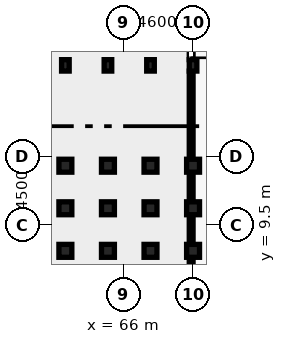
"""IFC4 building model, lengths in metres.
Left out: names, types, materials, properties, quantities, classifications, styles, units other than length and angle.
Written with IfcOpenShell. Run it as: python <this file> out.ifc"""

import sys

from ifc_helpers import new_model, si_unit, direction, frame, frame_2d, origin, origin_2d, place, context, subcontext, project, spatial, rectangle, extrude, element, fill, save


model = new_model("IFC4")
c1 = context("Model", 3, precision=1e-05, world=origin(), true_north=direction((0.0, 1.0)))
c2 = subcontext(c1, "Body", "Model", "MODEL_VIEW")
j1 = project(units=[si_unit("LENGTHUNIT", "METRE"), si_unit("PLANEANGLEUNIT", "RADIAN")], contexts=[c1])
p1 = place(None, origin())
s1 = spatial("IfcSite", under=j1, at=p1, CompositionType="ELEMENT")
p2 = place(p1, origin())
s2 = spatial("IfcBuilding", under=s1, at=p2, CompositionType="ELEMENT")
p3 = place(p2, origin())
s3 = spatial("IfcBuildingStorey", under=s2, at=p3, CompositionType="ELEMENT", Elevation=0.0)
p4 = place(p3, frame((62.2, 20.0, 0.0), z_axis=(0.0, 0.0, 1.0), x_axis=(1.0, 0.0, 0.0)))
e1 = element("IfcColumn", 1, at=p4, inside=s3, PredefinedType="COLUMN", context=c2, shape_type="SweptSolid", body=[
    extrude(rectangle(XDim=0.5, YDim=0.75, at=origin_2d()), origin(), (0.0, 0.0, 1.0), 4.15),
])
for number, where, z_axis, x_axis in (
    (2, (62.2, 13.4, 0.0), (0.0, 0.0, 1.0), (1.0, 0.0, 0.0)),
    (3, (62.2, 10.6, 0.0), (0.0, 0.0, 1.0), (1.0, 0.0, 0.0)),
    (4, (62.2, 7.8, 0.0), (0.0, 0.0, 1.0), (1.0, 0.0, 0.0)),
):
    element("IfcColumn", number, at=place(p3, frame(where, z_axis=z_axis, x_axis=x_axis)), inside=s3, PredefinedType="COLUMN", context=c2, shape_type="SweptSolid", body=[
        extrude(rectangle(XDim=0.85, YDim=0.85, at=origin_2d()), origin(), (0.0, 0.0, 1.0), 4.15),
    ])
p5 = place(p3, frame((65.0, 20.0, 0.0), z_axis=(0.0, 0.0, 1.0), x_axis=(1.0, 0.0, 0.0)))
e5 = element("IfcColumn", 5, at=p5, inside=s3, PredefinedType="COLUMN", context=c2, shape_type="SweptSolid", body=[
    extrude(rectangle(XDim=0.5, YDim=0.75, at=origin_2d()), origin(), (0.0, 0.0, 1.0), 4.15),
])
for number, where, z_axis, x_axis in (
    (6, (65.0, 13.4, 0.0), (0.0, 0.0, 1.0), (1.0, 0.0, 0.0)),
    (7, (65.0, 10.6, 0.0), (0.0, 0.0, 1.0), (1.0, 0.0, 0.0)),
    (8, (65.0, 7.8, 0.0), (0.0, 0.0, 1.0), (1.0, 0.0, 0.0)),
):
    element("IfcColumn", number, at=place(p3, frame(where, z_axis=z_axis, x_axis=x_axis)), inside=s3, PredefinedType="COLUMN", context=c2, shape_type="SweptSolid", body=[
        extrude(rectangle(XDim=0.85, YDim=0.85, at=origin_2d()), origin(), (0.0, 0.0, 1.0), 4.15),
    ])
p6 = place(p3, frame((67.8, 20.0, 0.0), z_axis=(0.0, 0.0, 1.0), x_axis=(1.0, 0.0, 0.0)))
e9 = element("IfcColumn", 9, at=p6, inside=s3, PredefinedType="COLUMN", context=c2, shape_type="SweptSolid", body=[
    extrude(rectangle(XDim=0.5, YDim=0.75, at=origin_2d()), origin(), (0.0, 0.0, 1.0), 4.15),
])
for number, where, z_axis, x_axis in (
    (10, (67.8, 13.4, 0.0), (0.0, 0.0, 1.0), (1.0, 0.0, 0.0)),
    (11, (67.8, 10.6, 0.0), (0.0, 0.0, 1.0), (1.0, 0.0, 0.0)),
    (12, (67.8, 7.8, 0.0), (0.0, 0.0, 1.0), (1.0, 0.0, 0.0)),
):
    element("IfcColumn", number, at=place(p3, frame(where, z_axis=z_axis, x_axis=x_axis)), inside=s3, PredefinedType="COLUMN", context=c2, shape_type="SweptSolid", body=[
        extrude(rectangle(XDim=0.85, YDim=0.85, at=origin_2d()), origin(), (0.0, 0.0, 1.0), 4.15),
    ])
p7 = place(p3, frame((70.6, 20.0, 0.0), z_axis=(0.0, 0.0, 1.0), x_axis=(1.0, 0.0, 0.0)))
e13 = element("IfcColumn", 13, at=p7, inside=s3, PredefinedType="COLUMN", context=c2, shape_type="SweptSolid", body=[
    extrude(rectangle(XDim=0.5, YDim=0.75, at=origin_2d()), origin(), (0.0, 0.0, 1.0), 4.15),
])
for number, where, z_axis, x_axis in (
    (14, (70.6, 13.4, 0.0), (0.0, 0.0, 1.0), (1.0, 0.0, 0.0)),
    (15, (70.6, 10.6, 0.0), (0.0, 0.0, 1.0), (1.0, 0.0, 0.0)),
    (16, (70.6, 7.8, 0.0), (0.0, 0.0, 1.0), (1.0, 0.0, 0.0)),
):
    element("IfcColumn", number, at=place(p3, frame(where, z_axis=z_axis, x_axis=x_axis)), inside=s3, PredefinedType="COLUMN", context=c2, shape_type="SweptSolid", body=[
        extrude(rectangle(XDim=0.85, YDim=0.85, at=origin_2d()), origin(), (0.0, 0.0, 1.0), 4.15),
    ])
p8 = place(p3, frame((59.4, 20.0, 0.0), z_axis=(0.0, 0.0, 1.0), x_axis=(1.0, 0.0, 0.0)))
e17 = element("IfcWall", 17, at=p8, inside=s3, PredefinedType="STANDARD", context=c2, shape_type="SweptSolid", body=[
    extrude(rectangle(XDim=2.8, YDim=0.2, at=frame_2d((1.4, 0.0))), origin(), (0.0, 0.0, 1.0), 3.492),
])
p9 = place(p8, frame((0.9, 0.0, 0.0)))
e18 = element("IfcOpeningElement", 18, at=p9, cuts=e17, PredefinedType="OPENING", context=c2, shape_type="SweptSolid", body=[
    extrude(rectangle(XDim=1.0, YDim=2.15, at=frame_2d((0.5, 1.075))), frame((0.0, 0.11, 0.0), z_axis=(0.0, -1.0, 0.0), x_axis=(1.0, 0.0, 0.0)), (0.0, 0.0, 1.0), 0.22),
])
p10 = place(p3, frame((59.48, 7.8, 0.0), z_axis=(0.0, 0.0, 1.0), x_axis=(1.0, 0.0, 0.0)))
e19 = element("IfcWall", 19, at=p10, inside=s3, PredefinedType="PLUMBINGWALL", context=c2, shape_type="SweptSolid", body=[
    extrude(rectangle(XDim=2.64, YDim=0.16, at=frame_2d((1.32, 0.0))), origin(), (0.0, 0.0, 1.0), 3.492),
])
p11 = place(p10, frame((0.87, 0.0, 0.0)))
e20 = element("IfcOpeningElement", 20, at=p11, cuts=e19, PredefinedType="OPENING", context=c2, shape_type="SweptSolid", body=[
    extrude(rectangle(XDim=0.9, YDim=2.1, at=frame_2d((0.45, 1.05))), frame((0.0, 0.09, 0.0), z_axis=(0.0, -1.0, 0.0), x_axis=(1.0, 0.0, 0.0)), (0.0, 0.0, 1.0), 0.18),
])
p12 = place(p3, frame((62.2, 20.0, 0.0), z_axis=(0.0, 0.0, 1.0), x_axis=(1.0, 0.0, 0.0)))
e21 = element("IfcWall", 21, at=p12, inside=s3, PredefinedType="STANDARD", context=c2, shape_type="SweptSolid", body=[
    extrude(rectangle(XDim=2.8, YDim=0.2, at=frame_2d((1.4, 0.0))), origin(), (0.0, 0.0, 1.0), 3.492),
])
p13 = place(p3, frame((62.28, 7.8, 0.0), z_axis=(0.0, 0.0, 1.0), x_axis=(1.0, 0.0, 0.0)))
e22 = element("IfcWall", 22, at=p13, inside=s3, PredefinedType="PLUMBINGWALL", context=c2, shape_type="SweptSolid", body=[
    extrude(rectangle(XDim=2.64, YDim=0.16, at=frame_2d((1.32, 0.0))), origin(), (0.0, 0.0, 1.0), 3.492),
])
p14 = place(p13, frame((0.92, 0.0, 0.0)))
e23 = element("IfcOpeningElement", 23, at=p14, cuts=e22, PredefinedType="OPENING", context=c2, shape_type="SweptSolid", body=[
    extrude(rectangle(XDim=0.8, YDim=2.1, at=frame_2d((0.4, 1.05))), frame((0.0, 0.09, 0.0), z_axis=(0.0, -1.0, 0.0), x_axis=(1.0, 0.0, 0.0)), (0.0, 0.0, 1.0), 0.18),
])
p15 = place(p3, frame((65.0, 20.0, 0.0), z_axis=(0.0, 0.0, 1.0), x_axis=(1.0, 0.0, 0.0)))
e24 = element("IfcWall", 24, at=p15, inside=s3, PredefinedType="STANDARD", context=c2, shape_type="SweptSolid", body=[
    extrude(rectangle(XDim=2.8, YDim=0.2, at=frame_2d((1.4, 0.0))), origin(), (0.0, 0.0, 1.0), 3.492),
])
p16 = place(p15, frame((0.9, 0.0, 0.0)))
e25 = element("IfcOpeningElement", 25, at=p16, cuts=e24, PredefinedType="OPENING", context=c2, shape_type="SweptSolid", body=[
    extrude(rectangle(XDim=1.0, YDim=2.15, at=frame_2d((0.5, 1.075))), frame((0.0, 0.11, 0.0), z_axis=(0.0, -1.0, 0.0), x_axis=(1.0, 0.0, 0.0)), (0.0, 0.0, 1.0), 0.22),
])
p17 = place(p3, frame((65.08, 7.8, 0.0), z_axis=(0.0, 0.0, 1.0), x_axis=(1.0, 0.0, 0.0)))
e26 = element("IfcWall", 26, at=p17, inside=s3, PredefinedType="PLUMBINGWALL", context=c2, shape_type="SweptSolid", body=[
    extrude(rectangle(XDim=2.64, YDim=0.16, at=frame_2d((1.32, 0.0))), origin(), (0.0, 0.0, 1.0), 3.492),
])
p18 = place(p17, frame((0.87, 0.0, 0.0)))
e27 = element("IfcOpeningElement", 27, at=p18, cuts=e26, PredefinedType="OPENING", context=c2, shape_type="SweptSolid", body=[
    extrude(rectangle(XDim=0.9, YDim=2.1, at=frame_2d((0.45, 1.05))), frame((0.0, 0.09, 0.0), z_axis=(0.0, -1.0, 0.0), x_axis=(1.0, 0.0, 0.0)), (0.0, 0.0, 1.0), 0.18),
])
p19 = place(p3, frame((67.8, 20.0, 0.0), z_axis=(0.0, 0.0, 1.0), x_axis=(1.0, 0.0, 0.0)))
e28 = element("IfcWall", 28, at=p19, inside=s3, PredefinedType="STANDARD", context=c2, shape_type="SweptSolid", body=[
    extrude(rectangle(XDim=2.8, YDim=0.2, at=frame_2d((1.4, 0.0))), origin(), (0.0, 0.0, 1.0), 3.492),
])
p20 = place(p3, frame((67.88, 7.8, 0.0), z_axis=(0.0, 0.0, 1.0), x_axis=(1.0, 0.0, 0.0)))
e29 = element("IfcWall", 29, at=p20, inside=s3, PredefinedType="PLUMBINGWALL", context=c2, shape_type="SweptSolid", body=[
    extrude(rectangle(XDim=2.64, YDim=0.16, at=frame_2d((1.32, 0.0))), origin(), (0.0, 0.0, 1.0), 3.492),
])
p21 = place(p20, frame((0.92, 0.0, 0.0)))
e30 = element("IfcOpeningElement", 30, at=p21, cuts=e29, PredefinedType="OPENING", context=c2, shape_type="SweptSolid", body=[
    extrude(rectangle(XDim=0.8, YDim=2.1, at=frame_2d((0.4, 1.05))), frame((0.0, 0.09, 0.0), z_axis=(0.0, -1.0, 0.0), x_axis=(1.0, 0.0, 0.0)), (0.0, 0.0, 1.0), 0.18),
])
p22 = place(p3, frame((62.2, 19.95, 0.0), z_axis=(0.0, 0.0, 1.0), x_axis=(0.0, -1.0, 0.0)))
e31 = element("IfcWall", 31, at=p22, inside=s3, PredefinedType="PARTITIONING", context=c2, shape_type="SweptSolid", body=[
    extrude(rectangle(XDim=6.53, YDim=0.15, at=frame_2d((3.265, 0.0))), origin(), (0.0, 0.0, 1.0), 3.492),
])
p23 = place(p22, frame((2.815, 0.0, 0.0)))
e32 = element("IfcOpeningElement", 32, at=p23, cuts=e31, PredefinedType="OPENING", context=c2, shape_type="SweptSolid", body=[
    extrude(rectangle(XDim=0.9, YDim=2.1, at=frame_2d((0.45, 1.05))), frame((0.0, 0.085, 0.0), z_axis=(0.0, -1.0, 0.0), x_axis=(1.0, 0.0, 0.0)), (0.0, 0.0, 1.0), 0.17),
])
p24 = place(p3, frame((62.2, 13.3, 0.0), z_axis=(0.0, 0.0, 1.0), x_axis=(0.0, -1.0, 0.0)))
e33 = element("IfcWall", 33, at=p24, inside=s3, PredefinedType="PARTITIONING", context=c2, shape_type="SweptSolid", body=[
    extrude(rectangle(XDim=10.82, YDim=0.15, at=frame_2d((5.41, 0.0))), origin(), (0.0, 0.0, 1.0), 3.492),
])
p25 = place(p24, frame((0.899, 0.0, 0.0)))
e34 = element("IfcOpeningElement", 34, at=p25, cuts=e33, PredefinedType="OPENING", context=c2, shape_type="SweptSolid", body=[
    extrude(rectangle(XDim=0.8, YDim=2.1, at=frame_2d((0.4, 1.05))), frame((0.0, 0.085, 0.0), z_axis=(0.0, -1.0, 0.0), x_axis=(1.0, 0.0, 0.0)), (0.0, 0.0, 1.0), 0.17),
])
p26 = place(p3, frame((65.0, 19.95, 0.0), z_axis=(0.0, 0.0, 1.0), x_axis=(0.0, -1.0, 0.0)))
e35 = element("IfcWall", 35, at=p26, inside=s3, PredefinedType="STANDARD", context=c2, shape_type="SweptSolid", body=[
    extrude(rectangle(XDim=6.53, YDim=0.22, at=frame_2d((3.265, 0.0))), origin(), (0.0, 0.0, 1.0), 3.492),
])
p27 = place(p3, frame((65.0, 13.3, 0.0), z_axis=(0.0, 0.0, 1.0), x_axis=(0.0, -1.0, 0.0)))
e36 = element("IfcWall", 36, at=p27, inside=s3, PredefinedType="STANDARD", context=c2, shape_type="SweptSolid", body=[
    extrude(rectangle(XDim=10.82, YDim=0.22, at=frame_2d((5.41, 0.0))), origin(), (0.0, 0.0, 1.0), 3.492),
])
p28 = place(p3, frame((67.8, 19.95, 0.0), z_axis=(0.0, 0.0, 1.0), x_axis=(0.0, -1.0, 0.0)))
e37 = element("IfcWall", 37, at=p28, inside=s3, PredefinedType="PARTITIONING", context=c2, shape_type="SweptSolid", body=[
    extrude(rectangle(XDim=6.53, YDim=0.15, at=frame_2d((3.265, 0.0))), origin(), (0.0, 0.0, 1.0), 3.492),
])
p29 = place(p28, frame((2.815, 0.0, 0.0)))
e38 = element("IfcOpeningElement", 38, at=p29, cuts=e37, PredefinedType="OPENING", context=c2, shape_type="SweptSolid", body=[
    extrude(rectangle(XDim=0.9, YDim=2.1, at=frame_2d((0.45, 1.05))), frame((0.0, 0.085, 0.0), z_axis=(0.0, -1.0, 0.0), x_axis=(1.0, 0.0, 0.0)), (0.0, 0.0, 1.0), 0.17),
])
p30 = place(p3, frame((67.8, 13.3, 0.0), z_axis=(0.0, 0.0, 1.0), x_axis=(0.0, -1.0, 0.0)))
e39 = element("IfcWall", 39, at=p30, inside=s3, PredefinedType="PARTITIONING", context=c2, shape_type="SweptSolid", body=[
    extrude(rectangle(XDim=10.82, YDim=0.15, at=frame_2d((5.41, 0.0))), origin(), (0.0, 0.0, 1.0), 3.492),
])
p31 = place(p30, frame((0.899, 0.0, 0.0)))
e40 = element("IfcOpeningElement", 40, at=p31, cuts=e39, PredefinedType="OPENING", context=c2, shape_type="SweptSolid", body=[
    extrude(rectangle(XDim=0.8, YDim=2.1, at=frame_2d((0.4, 1.05))), frame((0.0, 0.085, 0.0), z_axis=(0.0, -1.0, 0.0), x_axis=(1.0, 0.0, 0.0)), (0.0, 0.0, 1.0), 0.17),
])
p32 = place(p3, frame((70.475, 22.021, 0.0), z_axis=(0.0, 0.0, 1.0), x_axis=(0.0, -1.0, 0.0)))
e41 = element("IfcWall", 41, at=p32, inside=s3, PredefinedType="STANDARD", context=c2, shape_type="SweptSolid", body=[
    extrude(rectangle(XDim=1.643, YDim=0.25, at=frame_2d((0.822, 0.0))), origin(), (0.0, 0.0, 1.0), 3.492),
])
p33 = place(p32, frame((0.123, 0.0, 0.0)))
e42 = element("IfcOpeningElement", 42, at=p33, cuts=e41, PredefinedType="OPENING", context=c2, shape_type="SweptSolid", body=[
    extrude(rectangle(XDim=1.4, YDim=2.15, at=frame_2d((0.7, 1.075))), frame((0.0, 0.135, 0.0), z_axis=(0.0, -1.0, 0.0), x_axis=(1.0, 0.0, 0.0)), (0.0, 0.0, 1.0), 0.27),
])
p34 = place(p3, frame((70.475, 19.622, 0.0), z_axis=(0.0, 0.0, 1.0), x_axis=(0.0, -1.0, 0.0)))
e43 = element("IfcWall", 43, at=p34, inside=s3, PredefinedType="STANDARD", context=c2, shape_type="SweptSolid", body=[
    extrude(rectangle(XDim=5.802, YDim=0.25, at=frame_2d((2.901, 0.0))), origin(), (0.0, 0.0, 1.0), 3.492),
])
p35 = place(p34, frame((2.171, 0.0, 0.88)))
e44 = element("IfcOpeningElement", 44, at=p35, cuts=e43, PredefinedType="OPENING", context=c2, shape_type="SweptSolid", body=[
    extrude(rectangle(XDim=1.5, YDim=1.65, at=frame_2d((0.75, 0.825))), frame((0.0, 0.135, 0.0), z_axis=(0.0, -1.0, 0.0), x_axis=(1.0, 0.0, 0.0)), (0.0, 0.0, 1.0), 0.27),
])
p36 = place(p3, frame((70.475, 12.98, 0.0), z_axis=(0.0, 0.0, 1.0), x_axis=(0.0, -1.0, 0.0)))
e45 = element("IfcWall", 45, at=p36, inside=s3, PredefinedType="STANDARD", context=c2, shape_type="SweptSolid", body=[
    extrude(rectangle(XDim=1.96, YDim=0.25, at=frame_2d((0.98, 0.0))), origin(), (0.0, 0.0, 1.0), 3.492),
])
p37 = place(p36, frame((0.38, 0.0, 0.88)))
e46 = element("IfcOpeningElement", 46, at=p37, cuts=e45, PredefinedType="OPENING", context=c2, shape_type="SweptSolid", body=[
    extrude(rectangle(XDim=1.2, YDim=1.5, at=frame_2d((0.6, 0.75))), frame((0.0, 0.135, 0.0), z_axis=(0.0, -1.0, 0.0), x_axis=(1.0, 0.0, 0.0)), (0.0, 0.0, 1.0), 0.27),
])
p38 = place(p3, frame((70.475, 10.18, 0.0), z_axis=(0.0, 0.0, 1.0), x_axis=(0.0, -1.0, 0.0)))
e47 = element("IfcWall", 47, at=p38, inside=s3, PredefinedType="STANDARD", context=c2, shape_type="SweptSolid", body=[
    extrude(rectangle(XDim=1.96, YDim=0.25, at=frame_2d((0.98, 0.0))), origin(), (0.0, 0.0, 1.0), 3.492),
])
p39 = place(p38, frame((0.38, 0.0, 0.88)))
e48 = element("IfcOpeningElement", 48, at=p39, cuts=e47, PredefinedType="OPENING", context=c2, shape_type="SweptSolid", body=[
    extrude(rectangle(XDim=1.2, YDim=1.5, at=frame_2d((0.6, 0.75))), frame((0.0, 0.135, 0.0), z_axis=(0.0, -1.0, 0.0), x_axis=(1.0, 0.0, 0.0)), (0.0, 0.0, 1.0), 0.27),
])
p40 = place(p3, frame((70.475, 7.38, 0.0), z_axis=(0.0, 0.0, 1.0), x_axis=(0.0, -1.0, 0.0)))
e49 = element("IfcWall", 49, at=p40, inside=s3, PredefinedType="STANDARD", context=c2, shape_type="SweptSolid", body=[
    extrude(rectangle(XDim=1.96, YDim=0.25, at=frame_2d((0.98, 0.0))), origin(), (0.0, 0.0, 1.0), 3.492),
])
p41 = place(p40, frame((0.38, 0.0, 0.88)))
e50 = element("IfcOpeningElement", 50, at=p41, cuts=e49, PredefinedType="OPENING", context=c2, shape_type="SweptSolid", body=[
    extrude(rectangle(XDim=1.2, YDim=1.5, at=frame_2d((0.6, 0.75))), frame((0.0, 0.135, 0.0), z_axis=(0.0, -1.0, 0.0), x_axis=(1.0, 0.0, 0.0)), (0.0, 0.0, 1.0), 0.27),
])
p42 = place(p35, origin())
e51 = element("IfcWindow", 51, at=p42, inside=s3, PartitioningType="DOUBLE_PANEL_VERTICAL", PredefinedType="WINDOW", context=c2, shape_type="SweptSolid", body=[
    extrude(rectangle(XDim=1.5, YDim=1.65, at=frame_2d((0.75, 0.825))), frame((0.0, 0.03, 0.0), z_axis=(0.0, -1.0, 0.0), x_axis=(1.0, 0.0, 0.0)), (0.0, 0.0, 1.0), 0.06),
])
fill(e44, e51)
p43 = place(p37, origin())
e52 = element("IfcWindow", 52, at=p43, inside=s3, PartitioningType="SINGLE_PANEL", PredefinedType="WINDOW", context=c2, shape_type="SweptSolid", body=[
    extrude(rectangle(XDim=1.2, YDim=1.5, at=frame_2d((0.6, 0.75))), frame((0.0, 0.03, 0.0), z_axis=(0.0, -1.0, 0.0), x_axis=(1.0, 0.0, 0.0)), (0.0, 0.0, 1.0), 0.06),
])
fill(e46, e52)
p44 = place(p39, origin())
e53 = element("IfcWindow", 53, at=p44, inside=s3, PartitioningType="SINGLE_PANEL", PredefinedType="WINDOW", context=c2, shape_type="SweptSolid", body=[
    extrude(rectangle(XDim=1.2, YDim=1.5, at=frame_2d((0.6, 0.75))), frame((0.0, 0.03, 0.0), z_axis=(0.0, -1.0, 0.0), x_axis=(1.0, 0.0, 0.0)), (0.0, 0.0, 1.0), 0.06),
])
fill(e48, e53)
p45 = place(p41, origin())
e54 = element("IfcWindow", 54, at=p45, inside=s3, PartitioningType="SINGLE_PANEL", PredefinedType="WINDOW", context=c2, shape_type="SweptSolid", body=[
    extrude(rectangle(XDim=1.2, YDim=1.5, at=frame_2d((0.6, 0.75))), frame((0.0, 0.03, 0.0), z_axis=(0.0, -1.0, 0.0), x_axis=(1.0, 0.0, 0.0)), (0.0, 0.0, 1.0), 0.06),
])
fill(e50, e54)
p46 = place(p14, origin())
e55 = element("IfcDoor", 55, at=p46, inside=s3, OperationType="SINGLE_SWING_LEFT", PredefinedType="DOOR", context=c2, shape_type="SweptSolid", body=[
    extrude(rectangle(XDim=0.8, YDim=2.1, at=frame_2d((0.4, 1.05))), frame((0.0, 0.025, 0.0), z_axis=(0.0, -1.0, 0.0), x_axis=(1.0, 0.0, 0.0)), (0.0, 0.0, 1.0), 0.05),
])
fill(e23, e55)
p47 = place(p18, origin())
e56 = element("IfcDoor", 56, at=p47, inside=s3, OperationType="SINGLE_SWING_LEFT", PredefinedType="DOOR", context=c2, shape_type="SweptSolid", body=[
    extrude(rectangle(XDim=0.9, YDim=2.1, at=frame_2d((0.45, 1.05))), frame((0.0, 0.025, 0.0), z_axis=(0.0, -1.0, 0.0), x_axis=(1.0, 0.0, 0.0)), (0.0, 0.0, 1.0), 0.05),
])
fill(e27, e56)
p48 = place(p16, frame((1.0, 0.0, 0.0), z_axis=(0.0, 0.0, 1.0), x_axis=(-1.0, 0.0, 0.0)))
e57 = element("IfcDoor", 57, at=p48, inside=s3, OperationType="SINGLE_SWING_RIGHT", PredefinedType="DOOR", context=c2, shape_type="SweptSolid", body=[
    extrude(rectangle(XDim=1.0, YDim=2.15, at=frame_2d((0.5, 1.075))), frame((0.0, 0.025, 0.0), z_axis=(0.0, -1.0, 0.0), x_axis=(1.0, 0.0, 0.0)), (0.0, 0.0, 1.0), 0.05),
])
fill(e25, e57)
p49 = place(p21, origin())
e58 = element("IfcDoor", 58, at=p49, inside=s3, OperationType="SINGLE_SWING_LEFT", PredefinedType="DOOR", context=c2, shape_type="SweptSolid", body=[
    extrude(rectangle(XDim=0.8, YDim=2.1, at=frame_2d((0.4, 1.05))), frame((0.0, 0.025, 0.0), z_axis=(0.0, -1.0, 0.0), x_axis=(1.0, 0.0, 0.0)), (0.0, 0.0, 1.0), 0.05),
])
fill(e30, e58)
p50 = place(p23, frame((0.9, 0.0, 0.0), z_axis=(0.0, 0.0, 1.0), x_axis=(-1.0, 0.0, 0.0)))
e59 = element("IfcDoor", 59, at=p50, inside=s3, OperationType="SINGLE_SWING_RIGHT", PredefinedType="DOOR", context=c2, shape_type="SweptSolid", body=[
    extrude(rectangle(XDim=0.9, YDim=2.1, at=frame_2d((0.45, 1.05))), frame((0.0, 0.025, 0.0), z_axis=(0.0, -1.0, 0.0), x_axis=(1.0, 0.0, 0.0)), (0.0, 0.0, 1.0), 0.05),
])
fill(e32, e59)
p51 = place(p25, origin())
e60 = element("IfcDoor", 60, at=p51, inside=s3, OperationType="SINGLE_SWING_LEFT", PredefinedType="DOOR", context=c2, shape_type="SweptSolid", body=[
    extrude(rectangle(XDim=0.8, YDim=2.1, at=frame_2d((0.4, 1.05))), frame((0.0, 0.025, 0.0), z_axis=(0.0, -1.0, 0.0), x_axis=(1.0, 0.0, 0.0)), (0.0, 0.0, 1.0), 0.05),
])
fill(e34, e60)
p52 = place(p29, origin())
e61 = element("IfcDoor", 61, at=p52, inside=s3, OperationType="SINGLE_SWING_LEFT", PredefinedType="DOOR", context=c2, shape_type="SweptSolid", body=[
    extrude(rectangle(XDim=0.9, YDim=2.1, at=frame_2d((0.45, 1.05))), frame((0.0, 0.025, 0.0), z_axis=(0.0, -1.0, 0.0), x_axis=(1.0, 0.0, 0.0)), (0.0, 0.0, 1.0), 0.05),
])
fill(e38, e61)
p53 = place(p31, frame((0.8, 0.0, 0.0), z_axis=(0.0, 0.0, 1.0), x_axis=(-1.0, 0.0, 0.0)))
e62 = element("IfcDoor", 62, at=p53, inside=s3, OperationType="SINGLE_SWING_RIGHT", PredefinedType="DOOR", context=c2, shape_type="SweptSolid", body=[
    extrude(rectangle(XDim=0.8, YDim=2.1, at=frame_2d((0.4, 1.05))), frame((0.0, 0.025, 0.0), z_axis=(0.0, -1.0, 0.0), x_axis=(1.0, 0.0, 0.0)), (0.0, 0.0, 1.0), 0.05),
])
fill(e40, e62)
p54 = place(p33, origin())
e63 = element("IfcDoor", 63, at=p54, inside=s3, OperationType="SINGLE_SWING_RIGHT", PredefinedType="DOOR", context=c2, shape_type="SweptSolid", body=[
    extrude(rectangle(XDim=1.4, YDim=2.15, at=frame_2d((0.7, 1.075))), frame((0.0, 0.025, 0.0), z_axis=(0.0, -1.0, 0.0), x_axis=(1.0, 0.0, 0.0)), (0.0, 0.0, 1.0), 0.05),
])
fill(e42, e63)
save(model, sys.argv[1])
